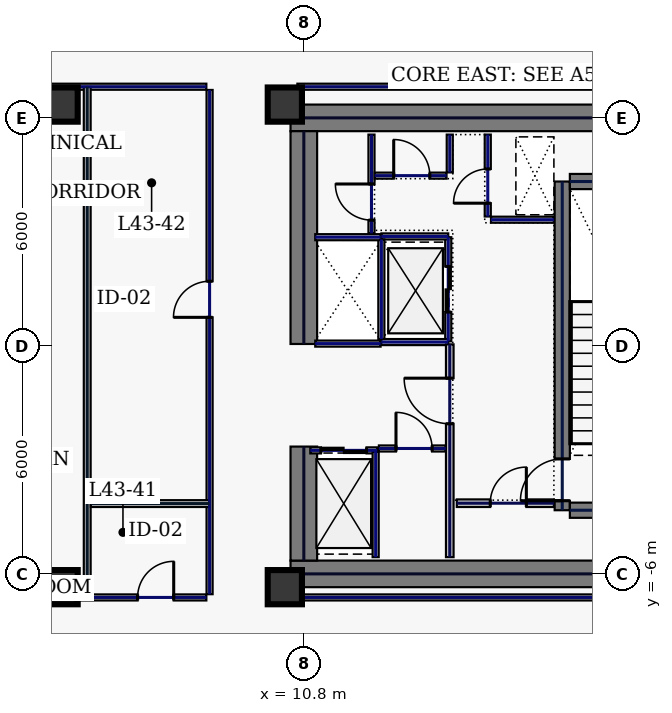
"""IFC4 building model, lengths in metres.
Left out: names, types, materials, properties, quantities, classifications, styles, units other than length and angle.
Written with IfcOpenShell. Run it as: python <this file> out.ifc"""

import sys

from ifc_helpers import new_model, si_unit, direction, frame, frame_2d, origin, origin_2d, place, context, subcontext, project, spatial, rectangle, hollow_rectangle, extrude, element, fill, save


model = new_model("IFC4")
c1 = context("Model", 3, precision=1e-05, world=origin(), true_north=direction((0.0, 1.0)))
c2 = subcontext(c1, "Body", "Model", "MODEL_VIEW")
j1 = project(units=[si_unit("LENGTHUNIT", "METRE"), si_unit("PLANEANGLEUNIT", "RADIAN")], contexts=[c1])
p1 = place(None, origin())
s1 = spatial("IfcSite", under=j1, at=p1, CompositionType="ELEMENT")
p2 = place(p1, origin())
s2 = spatial("IfcBuilding", under=s1, at=p2, CompositionType="ELEMENT")
p3 = place(p2, frame((0.0, 0.0, 188.2)))
s3 = spatial("IfcBuildingStorey", under=s2, at=p3, CompositionType="ELEMENT", Elevation=188.2)
for number, where, z_axis, x_axis in (
    (1, (10.45, 6.0, 0.0), (0.0, 0.0, 1.0), (1.0, 0.0, 0.0)),
    (2, (10.45, -6.0, 0.0), (0.0, 0.0, 1.0), (1.0, 0.0, 0.0)),
):
    element("IfcWall", number, at=place(p3, frame(where, z_axis=z_axis, x_axis=x_axis)), inside=s3, PredefinedType="SHEAR", context=c2, shape_type="SweptSolid", body=[
        extrude(rectangle(XDim=11.55, YDim=0.7, at=frame_2d((5.775, 0.0))), origin(), (0.0, 0.0, 1.0), 3.74),
    ])
p4 = place(p3, frame((10.8, -5.65, 0.0), z_axis=(0.0, 0.0, 1.0), x_axis=(0.0, 1.0, 0.0)))
e3 = element("IfcWall", 3, at=p4, inside=s3, PredefinedType="SHEAR", context=c2, shape_type="SweptSolid", body=[
    extrude(rectangle(XDim=3.0, YDim=0.7, at=frame_2d((1.5, 0.0))), origin(), (0.0, 0.0, 1.0), 3.74),
])
p5 = place(p3, frame((10.8, 0.05, 0.0), z_axis=(0.0, 0.0, 1.0), x_axis=(0.0, 1.0, 0.0)))
e4 = element("IfcWall", 4, at=p5, inside=s3, PredefinedType="SHEAR", context=c2, shape_type="SweptSolid", body=[
    extrude(rectangle(XDim=5.6, YDim=0.7, at=frame_2d((2.8, 0.0))), origin(), (0.0, 0.0, 1.0), 3.74),
])
p6 = place(p3, frame((17.6, -4.325, 0.0), z_axis=(0.0, 0.0, 1.0), x_axis=(0.0, 1.0, 0.0)))
e5 = element("IfcWall", 5, at=p6, inside=s3, PredefinedType="SHEAR", context=c2, shape_type="SweptSolid", body=[
    extrude(rectangle(XDim=8.65, YDim=0.4, at=frame_2d((4.325, 0.0))), origin(), (0.0, 0.0, 1.0), 3.74),
])
p7 = place(p6, frame((0.25, 0.0, 0.0)))
e6 = element("IfcOpeningElement", 6, at=p7, cuts=e5, PredefinedType="OPENING", context=c2, shape_type="SweptSolid", body=[
    extrude(rectangle(XDim=1.1, YDim=2.2, at=frame_2d((0.55, 1.1))), frame((0.0, 0.21, 0.0), z_axis=(0.0, -1.0, 0.0), x_axis=(1.0, 0.0, 0.0)), (0.0, 0.0, 1.0), 0.42),
])
for number, where, z_axis, x_axis in (
    (7, (17.8, -4.325, 0.0), (0.0, 0.0, 1.0), (1.0, 0.0, 0.0)),
    (8, (17.8, 4.325, 0.0), (0.0, 0.0, 1.0), (1.0, 0.0, 0.0)),
):
    element("IfcWall", number, at=place(p3, frame(where, z_axis=z_axis, x_axis=x_axis)), inside=s3, PredefinedType="SHEAR", context=c2, shape_type="SweptSolid", body=[
        extrude(rectangle(XDim=3.4, YDim=0.4, at=frame_2d((1.7, 0.0))), origin(), (0.0, 0.0, 1.0), 3.74),
    ])
for number, where, z_axis, x_axis in (
    (9, (10.3, -6.35, 0.0), (0.0, 0.0, 1.0), (1.0, 0.0, 0.0)),
    (10, (10.3, 6.35, 0.0), (0.0, 0.0, 1.0), (1.0, 0.0, 0.0)),
    (11, (4.4, -6.35, 0.0), (0.0, 0.0, 1.0), (1.0, 0.0, 0.0)),
    (12, (4.4, 6.35, 0.0), (0.0, 0.0, 1.0), (1.0, 0.0, 0.0)),
):
    element("IfcColumn", number, at=place(p3, frame(where, z_axis=z_axis, x_axis=x_axis)), inside=s3, PredefinedType="COLUMN", context=c2, shape_type="SweptSolid", body=[
        extrude(hollow_rectangle(XDim=0.9, YDim=0.9, WallThickness=0.04, at=origin_2d()), origin(), (0.0, 0.0, 1.0), 3.74),
    ])
p8 = place(p3, frame((14.6, 0.12, 0.0), z_axis=(0.0, 0.0, 1.0), x_axis=(0.0, 1.0, 0.0)))
e13 = element("IfcWall", 13, at=p8, inside=s3, PredefinedType="PARTITIONING", context=c2, shape_type="SweptSolid", body=[
    extrude(rectangle(XDim=2.74, YDim=0.16, at=frame_2d((1.37, 0.0))), origin(), (0.0, 0.0, 1.0), 3.74),
])
p9 = place(p8, frame((0.77, 0.0, 0.0)))
e14 = element("IfcOpeningElement", 14, at=p9, cuts=e13, PredefinedType="OPENING", context=c2, shape_type="SweptSolid", body=[
    extrude(rectangle(XDim=1.2, YDim=2.2, at=frame_2d((0.6, 1.1))), frame((0.0, 0.09, 0.0), z_axis=(0.0, -1.0, 0.0), x_axis=(1.0, 0.0, 0.0)), (0.0, 0.0, 1.0), 0.18),
])
for number, where, z_axis, x_axis in (
    (15, (12.84, 0.1, 0.0), (0.0, 0.0, 1.0), (1.0, 0.0, 0.0)),
    (16, (12.84, 2.88, 0.0), (0.0, 0.0, 1.0), (1.0, 0.0, 0.0)),
):
    element("IfcWall", number, at=place(p3, frame(where, z_axis=z_axis, x_axis=x_axis)), inside=s3, PredefinedType="PARTITIONING", context=c2, shape_type="SweptSolid", body=[
        extrude(rectangle(XDim=1.76, YDim=0.16, at=frame_2d((0.88, 0.0))), origin(), (0.0, 0.0, 1.0), 3.74),
    ])
p10 = place(p3, frame((12.84, 0.18, 0.0), z_axis=(0.0, 0.0, 1.0), x_axis=(0.0, 1.0, 0.0)))
e17 = element("IfcWall", 17, at=p10, inside=s3, PredefinedType="PARTITIONING", context=c2, shape_type="SweptSolid", body=[
    extrude(rectangle(XDim=2.62, YDim=0.16, at=frame_2d((1.31, 0.0))), origin(), (0.0, 0.0, 1.0), 3.74),
])
p11 = place(p3, frame((10.97, -2.75, 0.0), z_axis=(0.0, 0.0, 1.0), x_axis=(1.0, 0.0, 0.0)))
e18 = element("IfcWall", 18, at=p11, inside=s3, PredefinedType="PARTITIONING", context=c2, shape_type="SweptSolid", body=[
    extrude(rectangle(XDim=1.76, YDim=0.16, at=frame_2d((0.88, 0.0))), origin(), (0.0, 0.0, 1.0), 3.74),
])
p12 = place(p11, frame((0.28, 0.0, 0.0)))
e19 = element("IfcOpeningElement", 19, at=p12, cuts=e18, PredefinedType="OPENING", context=c2, shape_type="SweptSolid", body=[
    extrude(rectangle(XDim=1.2, YDim=2.2, at=frame_2d((0.6, 1.1))), frame((0.0, 0.09, 0.0), z_axis=(0.0, -1.0, 0.0), x_axis=(1.0, 0.0, 0.0)), (0.0, 0.0, 1.0), 0.18),
])
for number, where, z_axis, x_axis in (
    (20, (11.1, 0.06, 0.0), (0.0, 0.0, 1.0), (1.0, 0.0, 0.0)),
    (21, (11.1, 2.86, 0.0), (0.0, 0.0, 1.0), (1.0, 0.0, 0.0)),
):
    element("IfcWall", number, at=place(p3, frame(where, z_axis=z_axis, x_axis=x_axis)), inside=s3, PredefinedType="PARTITIONING", context=c2, shape_type="SweptSolid", body=[
        extrude(rectangle(XDim=1.72, YDim=0.16, at=frame_2d((0.86, 0.0))), origin(), (0.0, 0.0, 1.0), 3.74),
    ])
p13 = place(p3, frame((15.64, 3.405, 0.0), z_axis=(0.0, 0.0, 1.0), x_axis=(0.0, 1.0, 0.0)))
e22 = element("IfcWall", 22, at=p13, inside=s3, PredefinedType="PARTITIONING", context=c2, shape_type="SweptSolid", body=[
    extrude(rectangle(XDim=2.155, YDim=0.16, at=frame_2d((1.078, 0.0))), origin(), (0.0, 0.0, 1.0), 3.74),
])
p14 = place(p13, frame((0.35, 0.0, 0.0)))
e23 = element("IfcOpeningElement", 23, at=p14, cuts=e22, PredefinedType="OPENING", context=c2, shape_type="SweptSolid", body=[
    extrude(rectangle(XDim=0.9, YDim=2.2, at=frame_2d((0.45, 1.1))), frame((0.0, 0.09, 0.0), z_axis=(0.0, -1.0, 0.0), x_axis=(1.0, 0.0, 0.0)), (0.0, 0.0, 1.0), 0.18),
])
p15 = place(p3, frame((15.725, 3.32, 0.0), z_axis=(0.0, 0.0, 1.0), x_axis=(1.0, 0.0, 0.0)))
e24 = element("IfcWall", 24, at=p15, inside=s3, PredefinedType="PARTITIONING", context=c2, shape_type="SweptSolid", body=[
    extrude(rectangle(XDim=1.655, YDim=0.16, at=frame_2d((0.827, 0.0))), origin(), (0.0, 0.0, 1.0), 3.74),
])
p16 = place(p3, frame((14.825, -4.14, 0.0), z_axis=(0.0, 0.0, 1.0), x_axis=(1.0, 0.0, 0.0)))
e25 = element("IfcWall", 25, at=p16, inside=s3, PredefinedType="SOLIDWALL", context=c2, shape_type="SweptSolid", body=[
    extrude(rectangle(XDim=2.555, YDim=0.2, at=frame_2d((1.277, 0.0))), origin(), (0.0, 0.0, 1.0), 3.74),
])
p17 = place(p16, frame((0.88, 0.0, 0.0)))
e26 = element("IfcOpeningElement", 26, at=p17, cuts=e25, PredefinedType="OPENING", context=c2, shape_type="SweptSolid", body=[
    extrude(rectangle(XDim=0.95, YDim=2.2, at=frame_2d((0.475, 1.1))), frame((0.0, 0.11, 0.0), z_axis=(0.0, -1.0, 0.0), x_axis=(1.0, 0.0, 0.0)), (0.0, 0.0, 1.0), 0.22),
])
p18 = place(p3, frame((12.775, -2.7, 0.0), z_axis=(0.0, 0.0, 1.0), x_axis=(1.0, 0.0, 0.0)))
e27 = element("IfcWall", 27, at=p18, inside=s3, PredefinedType="PARTITIONING", context=c2, shape_type="SweptSolid", body=[
    extrude(rectangle(XDim=1.76, YDim=0.16, at=frame_2d((0.88, 0.0))), origin(), (0.0, 0.0, 1.0), 3.74),
])
p19 = place(p18, frame((0.45, 0.0, 0.0)))
e28 = element("IfcOpeningElement", 28, at=p19, cuts=e27, PredefinedType="OPENING", context=c2, shape_type="SweptSolid", body=[
    extrude(rectangle(XDim=0.95, YDim=2.2, at=frame_2d((0.475, 1.1))), frame((0.0, 0.09, 0.0), z_axis=(0.0, -1.0, 0.0), x_axis=(1.0, 0.0, 0.0)), (0.0, 0.0, 1.0), 0.18),
])
p20 = place(p3, frame((12.69, -5.56, 0.0), z_axis=(0.0, 0.0, 1.0), x_axis=(0.0, 1.0, 0.0)))
e29 = element("IfcWall", 29, at=p20, inside=s3, PredefinedType="PARTITIONING", context=c2, shape_type="SweptSolid", body=[
    extrude(rectangle(XDim=2.775, YDim=0.16, at=frame_2d((1.388, 0.0))), origin(), (0.0, 0.0, 1.0), 3.74),
])
p21 = place(p3, frame((12.58, 2.96, 0.0), z_axis=(0.0, 0.0, 1.0), x_axis=(0.0, 1.0, 0.0)))
e30 = element("IfcWall", 30, at=p21, inside=s3, PredefinedType="PARTITIONING", context=c2, shape_type="SweptSolid", body=[
    extrude(rectangle(XDim=2.6, YDim=0.16, at=frame_2d((1.3, 0.0))), origin(), (0.0, 0.0, 1.0), 3.74),
])
p22 = place(p21, frame((0.35, 0.0, 0.0)))
e31 = element("IfcOpeningElement", 31, at=p22, cuts=e30, PredefinedType="OPENING", context=c2, shape_type="SweptSolid", body=[
    extrude(rectangle(XDim=0.95, YDim=2.2, at=frame_2d((0.475, 1.1))), frame((0.0, 0.09, 0.0), z_axis=(0.0, -1.0, 0.0), x_axis=(1.0, 0.0, 0.0)), (0.0, 0.0, 1.0), 0.18),
])
p23 = place(p3, frame((12.665, 4.48, 0.0), z_axis=(0.0, 0.0, 1.0), x_axis=(1.0, 0.0, 0.0)))
e32 = element("IfcWall", 32, at=p23, inside=s3, PredefinedType="PARTITIONING", context=c2, shape_type="SweptSolid", body=[
    extrude(rectangle(XDim=1.89, YDim=0.16, at=frame_2d((0.945, 0.0))), origin(), (0.0, 0.0, 1.0), 3.74),
])
p24 = place(p23, frame((0.5, 0.0, 0.0)))
e33 = element("IfcOpeningElement", 33, at=p24, cuts=e32, PredefinedType="OPENING", context=c2, shape_type="SweptSolid", body=[
    extrude(rectangle(XDim=0.95, YDim=2.2, at=frame_2d((0.475, 1.1))), frame((0.0, 0.09, 0.0), z_axis=(0.0, -1.0, 0.0), x_axis=(1.0, 0.0, 0.0)), (0.0, 0.0, 1.0), 0.18),
])
p25 = place(p3, frame((14.64, 4.565, 0.0), z_axis=(0.0, 0.0, 1.0), x_axis=(0.0, 1.0, 0.0)))
e34 = element("IfcWall", 34, at=p25, inside=s3, PredefinedType="PARTITIONING", context=c2, shape_type="SweptSolid", body=[
    extrude(rectangle(XDim=0.995, YDim=0.16, at=frame_2d((0.498, 0.0))), origin(), (0.0, 0.0, 1.0), 3.74),
])
p26 = place(p3, frame((14.64, -5.56, 0.0), z_axis=(0.0, 0.0, 1.0), x_axis=(0.0, 1.0, 0.0)))
e35 = element("IfcWall", 35, at=p26, inside=s3, PredefinedType="SOLIDWALL", context=c2, shape_type="SweptSolid", body=[
    extrude(rectangle(XDim=5.6, YDim=0.2, at=frame_2d((2.8, 0.0))), origin(), (0.0, 0.0, 1.0), 3.74),
])
p27 = place(p26, frame((3.51, 0.0, 0.0)))
e36 = element("IfcOpeningElement", 36, at=p27, cuts=e35, PredefinedType="OPENING", context=c2, shape_type="SweptSolid", body=[
    extrude(rectangle(XDim=1.2, YDim=2.2, at=frame_2d((0.6, 1.1))), frame((0.0, 0.11, 0.0), z_axis=(0.0, -1.0, 0.0), x_axis=(1.0, 0.0, 0.0)), (0.0, 0.0, 1.0), 0.22),
])
for number, where, z_axis, x_axis in (
    (37, (24.965, 6.82, 0.0), (0.0, 0.0, 1.0), (-1.0, 0.0, 0.0)),
    (38, (10.63, -6.62, 0.0), (0.0, 0.0, 1.0), (1.0, 0.0, 0.0)),
):
    element("IfcWall", number, at=place(p3, frame(where, z_axis=z_axis, x_axis=x_axis)), inside=s3, PredefinedType="PARTITIONING", context=c2, shape_type="SweptSolid", body=[
        extrude(rectangle(XDim=14.335, YDim=0.16, at=frame_2d((7.167, 0.0))), origin(), (0.0, 0.0, 1.0), 3.74),
    ])
p28 = place(p3, frame((8.235, 6.82, 0.0), z_axis=(0.0, 0.0, 1.0), x_axis=(-1.0, 0.0, 0.0)))
e39 = element("IfcWall", 39, at=p28, inside=s3, PredefinedType="PARTITIONING", context=c2, shape_type="SweptSolid", body=[
    extrude(rectangle(XDim=6.82, YDim=0.16, at=frame_2d((3.41, 0.0))), origin(), (0.0, 0.0, 1.0), 3.74),
])
p29 = place(p3, frame((1.415, -6.62, 0.0), z_axis=(0.0, 0.0, 1.0), x_axis=(1.0, 0.0, 0.0)))
e40 = element("IfcWall", 40, at=p29, inside=s3, PredefinedType="PARTITIONING", context=c2, shape_type="SweptSolid", body=[
    extrude(rectangle(XDim=6.82, YDim=0.16, at=frame_2d((3.41, 0.0))), origin(), (0.0, 0.0, 1.0), 3.74),
])
p30 = place(p29, frame((5.011, 0.0, 0.0)))
e41 = element("IfcOpeningElement", 41, at=p30, cuts=e40, PredefinedType="OPENING", context=c2, shape_type="SweptSolid", body=[
    extrude(rectangle(XDim=0.95, YDim=2.2, at=frame_2d((0.475, 1.1))), frame((0.0, 0.09, 0.0), z_axis=(0.0, -1.0, 0.0), x_axis=(1.0, 0.0, 0.0)), (0.0, 0.0, 1.0), 0.18),
])
p31 = place(p3, frame((8.32, -6.535, 0.0), z_axis=(0.0, 0.0, 1.0), x_axis=(0.0, 1.0, 0.0)))
e42 = element("IfcWall", 42, at=p31, inside=s3, PredefinedType="PARTITIONING", context=c2, shape_type="SweptSolid", body=[
    extrude(rectangle(XDim=13.27, YDim=0.16, at=frame_2d((6.635, 0.0))), origin(), (0.0, 0.0, 1.0), 3.74),
])
p32 = place(p31, frame((7.286, 0.0, 0.0)))
e43 = element("IfcOpeningElement", 43, at=p32, cuts=e42, PredefinedType="OPENING", context=c2, shape_type="SweptSolid", body=[
    extrude(rectangle(XDim=0.95, YDim=2.2, at=frame_2d((0.475, 1.1))), frame((0.0, 0.09, 0.0), z_axis=(0.0, -1.0, 0.0), x_axis=(1.0, 0.0, 0.0)), (0.0, 0.0, 1.0), 0.18),
])
p33 = place(p3, frame((5.1, -6.615, 0.0), z_axis=(0.0, 0.0, 1.0), x_axis=(0.0, 1.0, 0.0)))
e44 = element("IfcWall", 44, at=p33, inside=s3, PredefinedType="PARTITIONING", context=c2, shape_type="SweptSolid", body=[
    extrude(rectangle(XDim=13.43, YDim=0.18, at=frame_2d((6.715, 0.0))), origin(), (0.0, 0.0, 1.0), 3.74),
])
p34 = place(p3, frame((5.195, -4.15, 0.0), z_axis=(0.0, 0.0, 1.0), x_axis=(1.0, 0.0, 0.0)))
e45 = element("IfcWall", 45, at=p34, inside=s3, PredefinedType="PARTITIONING", context=c2, shape_type="SweptSolid", body=[
    extrude(rectangle(XDim=3.12, YDim=0.18, at=frame_2d((1.56, 0.0))), origin(), (0.0, 0.0, 1.0), 3.74),
])
p35 = place(p7, origin())
e46 = element("IfcDoor", 46, at=p35, inside=s3, OperationType="SINGLE_SWING_LEFT", PredefinedType="DOOR", context=c2, shape_type="SweptSolid", body=[
    extrude(rectangle(XDim=1.1, YDim=2.2, at=frame_2d((0.55, 1.1))), frame((0.0, 0.025, 0.0), z_axis=(0.0, -1.0, 0.0), x_axis=(1.0, 0.0, 0.0)), (0.0, 0.0, 1.0), 0.05),
])
fill(e6, e46)
p36 = place(p9, origin())
e47 = element("IfcDoor", 47, at=p36, inside=s3, OperationType="SLIDING_TO_LEFT", PredefinedType="DOOR", context=c2, shape_type="SweptSolid", body=[
    extrude(rectangle(XDim=1.2, YDim=2.2, at=frame_2d((0.6, 1.1))), frame((0.0, 0.025, 0.0), z_axis=(0.0, -1.0, 0.0), x_axis=(1.0, 0.0, 0.0)), (0.0, 0.0, 1.0), 0.05),
])
fill(e14, e47)
p37 = place(p12, origin())
e48 = element("IfcDoor", 48, at=p37, inside=s3, OperationType="SLIDING_TO_LEFT", PredefinedType="DOOR", context=c2, shape_type="SweptSolid", body=[
    extrude(rectangle(XDim=1.2, YDim=2.2, at=frame_2d((0.6, 1.1))), frame((0.0, 0.025, 0.0), z_axis=(0.0, -1.0, 0.0), x_axis=(1.0, 0.0, 0.0)), (0.0, 0.0, 1.0), 0.05),
])
fill(e19, e48)
p38 = place(p14, origin())
e49 = element("IfcDoor", 49, at=p38, inside=s3, OperationType="SINGLE_SWING_LEFT", PredefinedType="DOOR", context=c2, shape_type="SweptSolid", body=[
    extrude(rectangle(XDim=0.9, YDim=2.2, at=frame_2d((0.45, 1.1))), frame((0.0, 0.025, 0.0), z_axis=(0.0, -1.0, 0.0), x_axis=(1.0, 0.0, 0.0)), (0.0, 0.0, 1.0), 0.05),
])
fill(e23, e49)
p39 = place(p17, origin())
e50 = element("IfcDoor", 50, at=p39, inside=s3, OperationType="SINGLE_SWING_RIGHT", PredefinedType="DOOR", context=c2, shape_type="SweptSolid", body=[
    extrude(rectangle(XDim=0.95, YDim=2.2, at=frame_2d((0.475, 1.1))), frame((0.0, 0.025, 0.0), z_axis=(0.0, -1.0, 0.0), x_axis=(1.0, 0.0, 0.0)), (0.0, 0.0, 1.0), 0.05),
])
fill(e26, e50)
p40 = place(p19, origin())
e51 = element("IfcDoor", 51, at=p40, inside=s3, OperationType="SINGLE_SWING_LEFT", PredefinedType="DOOR", context=c2, shape_type="SweptSolid", body=[
    extrude(rectangle(XDim=0.95, YDim=2.2, at=frame_2d((0.475, 1.1))), frame((0.0, 0.025, 0.0), z_axis=(0.0, -1.0, 0.0), x_axis=(1.0, 0.0, 0.0)), (0.0, 0.0, 1.0), 0.05),
])
fill(e28, e51)
p41 = place(p22, origin())
e52 = element("IfcDoor", 52, at=p41, inside=s3, OperationType="SINGLE_SWING_RIGHT", PredefinedType="DOOR", context=c2, shape_type="SweptSolid", body=[
    extrude(rectangle(XDim=0.95, YDim=2.2, at=frame_2d((0.475, 1.1))), frame((0.0, 0.025, 0.0), z_axis=(0.0, -1.0, 0.0), x_axis=(1.0, 0.0, 0.0)), (0.0, 0.0, 1.0), 0.05),
])
fill(e31, e52)
p42 = place(p24, origin())
e53 = element("IfcDoor", 53, at=p42, inside=s3, OperationType="SINGLE_SWING_LEFT", PredefinedType="DOOR", context=c2, shape_type="SweptSolid", body=[
    extrude(rectangle(XDim=0.95, YDim=2.2, at=frame_2d((0.475, 1.1))), frame((0.0, 0.025, 0.0), z_axis=(0.0, -1.0, 0.0), x_axis=(1.0, 0.0, 0.0)), (0.0, 0.0, 1.0), 0.05),
])
fill(e33, e53)
p43 = place(p27, origin())
e54 = element("IfcDoor", 54, at=p43, inside=s3, OperationType="SINGLE_SWING_RIGHT", PredefinedType="DOOR", context=c2, shape_type="SweptSolid", body=[
    extrude(rectangle(XDim=1.2, YDim=2.2, at=frame_2d((0.6, 1.1))), frame((0.0, 0.025, 0.0), z_axis=(0.0, -1.0, 0.0), x_axis=(1.0, 0.0, 0.0)), (0.0, 0.0, 1.0), 0.05),
])
fill(e36, e54)
p44 = place(p30, origin())
e55 = element("IfcDoor", 55, at=p44, inside=s3, OperationType="SINGLE_SWING_RIGHT", PredefinedType="DOOR", context=c2, shape_type="SweptSolid", body=[
    extrude(rectangle(XDim=0.95, YDim=2.2, at=frame_2d((0.475, 1.1))), frame((0.0, 0.025, 0.0), z_axis=(0.0, -1.0, 0.0), x_axis=(1.0, 0.0, 0.0)), (0.0, 0.0, 1.0), 0.05),
])
fill(e41, e55)
p45 = place(p32, origin())
e56 = element("IfcDoor", 56, at=p45, inside=s3, OperationType="SINGLE_SWING_LEFT", PredefinedType="DOOR", context=c2, shape_type="SweptSolid", body=[
    extrude(rectangle(XDim=0.95, YDim=2.2, at=frame_2d((0.475, 1.1))), frame((0.0, 0.025, 0.0), z_axis=(0.0, -1.0, 0.0), x_axis=(1.0, 0.0, 0.0)), (0.0, 0.0, 1.0), 0.05),
])
fill(e43, e56)
save(model, sys.argv[1])
